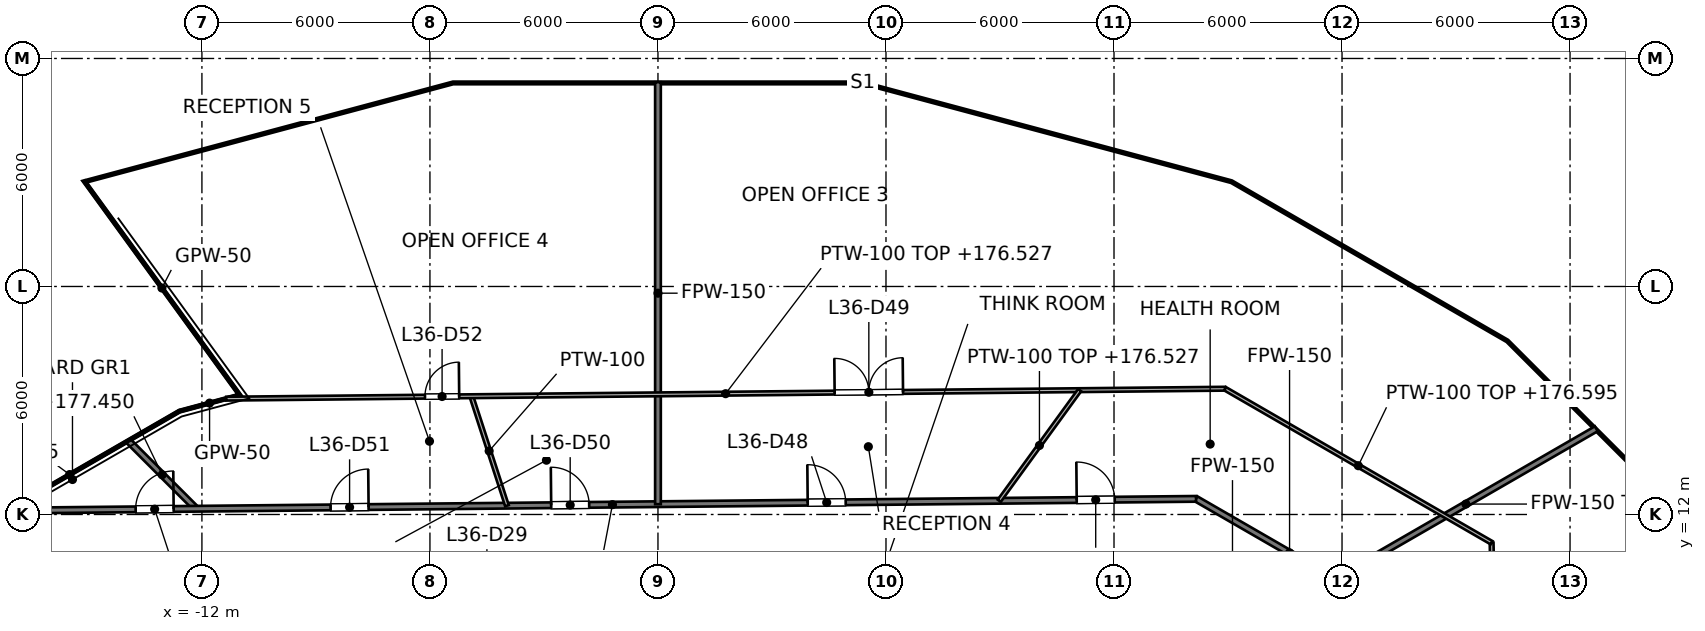
"""IFC4 building model, lengths in metres.
Left out: names, types, materials, properties, quantities, classifications, styles, units other than length and angle.
Written with IfcOpenShell. Run it as: python <this file> out.ifc"""

import sys

from ifc_helpers import new_model, si_unit, direction, frame, frame_2d, origin, place, context, subcontext, project, spatial, rectangle, extrude, element, fill, save


model = new_model("IFC4")
c1 = context("Model", 3, precision=1e-05, world=origin(), true_north=direction((0.0, 1.0)))
c2 = subcontext(c1, "Body", "Model", "MODEL_VIEW")
j1 = project(units=[si_unit("LENGTHUNIT", "METRE"), si_unit("PLANEANGLEUNIT", "RADIAN")], contexts=[c1])
p1 = place(None, origin())
s1 = spatial("IfcSite", under=j1, at=p1, CompositionType="ELEMENT")
p2 = place(p1, origin())
s2 = spatial("IfcBuilding", under=s1, at=p2, CompositionType="ELEMENT")
p3 = place(p2, frame((0.0, 0.0, 173.6)))
s3 = spatial("IfcBuildingStorey", under=s2, at=p3, CompositionType="ELEMENT", Elevation=173.6)
p4 = place(p3, frame((-13.94, 13.94, 0.0), z_axis=(0.0, 0.0, 1.0), x_axis=(0.707106781187, -0.707106781187, 0.0)))
e1 = element("IfcWall", 1, at=p4, inside=s3, PredefinedType="PARTITIONING", context=c2, shape_type="SweptSolid", body=[
    extrude(rectangle(XDim=2.53, YDim=0.15, at=frame_2d((1.265, 0.0))), origin(), (0.0, 0.0, 1.0), 3.85),
])
p5 = place(p3, frame((14.159, 12.412, 0.0), z_axis=(0.0, 0.0, 1.0), x_axis=(0.865963066672, -0.500107955506, 0.0)))
e2 = element("IfcWall", 2, at=p5, inside=s3, PredefinedType="PARTITIONING", context=c2, shape_type="SweptSolid", body=[
    extrude(rectangle(XDim=5.683, YDim=0.15, at=frame_2d((2.841, 0.0))), origin(), (0.0, 0.0, 1.0), 2.995),
])
p6 = place(p3, frame((-16.555, 12.107, 0.0), z_axis=(0.0, 0.0, 1.0), x_axis=(0.999950956073, 0.009903809825, 0.0)))
e3 = element("IfcWall", 3, at=p6, inside=s3, PredefinedType="PARTITIONING", context=c2, shape_type="SweptSolid", body=[
    extrude(rectangle(XDim=30.715, YDim=0.15, at=frame_2d((15.358, 0.0))), origin(), (0.0, 0.0, 1.0), 2.927),
])
p7 = place(p6, frame((27.575, 0.0, 0.0)))
e4 = element("IfcOpeningElement", 4, at=p7, cuts=e3, PredefinedType="OPENING", context=c2, shape_type="SweptSolid", body=[
    extrude(rectangle(XDim=1.0, YDim=2.1, at=frame_2d((0.5, 1.05))), frame((0.0, 0.075, 0.0), z_axis=(0.0, -1.0, 0.0), x_axis=(1.0, 0.0, 0.0)), (0.0, 0.0, 1.0), 0.15),
])
p8 = place(p6, frame((20.496, 0.0, 0.0)))
e5 = element("IfcOpeningElement", 5, at=p8, cuts=e3, PredefinedType="OPENING", context=c2, shape_type="SweptSolid", body=[
    extrude(rectangle(XDim=1.0, YDim=2.1, at=frame_2d((0.5, 1.05))), frame((0.0, 0.075, 0.0), z_axis=(0.0, -1.0, 0.0), x_axis=(1.0, 0.0, 0.0)), (0.0, 0.0, 1.0), 0.15),
])
p9 = place(p6, frame((13.746, 0.0, 0.0)))
e6 = element("IfcOpeningElement", 6, at=p9, cuts=e3, PredefinedType="OPENING", context=c2, shape_type="SweptSolid", body=[
    extrude(rectangle(XDim=1.0, YDim=2.1, at=frame_2d((0.5, 1.05))), frame((0.0, 0.075, 0.0), z_axis=(0.0, -1.0, 0.0), x_axis=(1.0, 0.0, 0.0)), (0.0, 0.0, 1.0), 0.15),
])
p10 = place(p6, frame((7.941, 0.0, 0.0)))
e7 = element("IfcOpeningElement", 7, at=p10, cuts=e3, PredefinedType="OPENING", context=c2, shape_type="SweptSolid", body=[
    extrude(rectangle(XDim=1.0, YDim=2.1, at=frame_2d((0.5, 1.05))), frame((0.0, 0.075, 0.0), z_axis=(0.0, -1.0, 0.0), x_axis=(1.0, 0.0, 0.0)), (0.0, 0.0, 1.0), 0.15),
])
p11 = place(p6, frame((2.812, 0.0, 0.0)))
e8 = element("IfcOpeningElement", 8, at=p11, cuts=e3, PredefinedType="OPENING", context=c2, shape_type="SweptSolid", body=[
    extrude(rectangle(XDim=1.0, YDim=2.1, at=frame_2d((0.5, 1.05))), frame((0.0, 0.075, 0.0), z_axis=(0.0, -1.0, 0.0), x_axis=(1.0, 0.0, 0.0)), (0.0, 0.0, 1.0), 0.15),
])
p12 = place(p3, frame((17.828, 10.293, 0.0), z_axis=(0.0, 0.0, 1.0), x_axis=(0.866006511702, 0.500032720618, 0.0)))
e9 = element("IfcWall", 9, at=p12, inside=s3, PredefinedType="PARTITIONING", context=c2, shape_type="SweptSolid", body=[
    extrude(rectangle(XDim=7.924, YDim=0.15, at=frame_2d((3.962, 0.0))), origin(), (0.0, 0.0, 1.0), 3.152),
])
p13 = place(p3, frame((0.0, 12.271, 0.0), z_axis=(0.0, 0.0, 1.0), x_axis=(0.0, 1.0, 0.0)))
e10 = element("IfcWall", 10, at=p13, inside=s3, PredefinedType="PARTITIONING", context=c2, shape_type="SweptSolid", body=[
    extrude(rectangle(XDim=11.105, YDim=0.15, at=frame_2d((5.552, 0.0))), origin(), (0.0, 0.0, 1.0), 2.995),
])
p14 = place(p3, frame((-15.1, 20.776, 0.0), z_axis=(0.0, 0.0, 1.0), x_axis=(0.587927764286, -0.808913434171, 0.0)))
e11 = element("IfcWall", 11, at=p14, inside=s3, PredefinedType="PARTITIONING", context=c2, shape_type="SweptSolid", body=[
    extrude(rectangle(XDim=6.963, YDim=0.05, at=frame_2d((3.482, 0.0))), origin(), (0.0, 0.0, 1.0), 2.927),
])
p15 = place(p3, frame((-12.591, 14.719, 0.0), z_axis=(0.0, 0.0, 1.0), x_axis=(0.965982574514, 0.258607164896, 0.0)))
e12 = element("IfcWall", 12, at=p15, inside=s3, PredefinedType="PARTITIONING", context=c2, shape_type="SweptSolid", body=[
    extrude(rectangle(XDim=1.641, YDim=0.05, at=frame_2d((0.82, 0.0))), origin(), (0.0, 0.0, 1.0), 2.927),
])
p16 = place(p3, frame((-18.371, 11.382, 0.0), z_axis=(0.0, 0.0, 1.0), x_axis=(0.866021723044, 0.500006375176, 0.0)))
e13 = element("IfcWall", 13, at=p16, inside=s3, PredefinedType="PARTITIONING", context=c2, shape_type="SweptSolid", body=[
    extrude(rectangle(XDim=6.674, YDim=0.05, at=frame_2d((3.337, 0.0))), origin(), (0.0, 0.0, 1.0), 2.995),
])
p17 = place(p3, frame((21.936, 11.258, 0.0), z_axis=(0.0, 0.0, 1.0), x_axis=(0.020580799217, -0.999788192921, 0.0)))
e14 = element("IfcWall", 14, at=p17, inside=s3, PredefinedType="PARTITIONING", context=c2, shape_type="SweptSolid", body=[
    extrude(rectangle(XDim=19.146, YDim=0.1, at=frame_2d((9.573, 0.0))), origin(), (0.0, 0.0, 1.0), 2.927),
])
p18 = place(p17, frame((1.724, 0.0, 0.0)))
e15 = element("IfcOpeningElement", 15, at=p18, cuts=e14, PredefinedType="OPENING", context=c2, shape_type="SweptSolid", body=[
    extrude(rectangle(XDim=1.8, YDim=2.1, at=frame_2d((0.9, 1.05))), frame((0.0, 0.05, 0.0), z_axis=(0.0, -1.0, 0.0), x_axis=(1.0, 0.0, 0.0)), (0.0, 0.0, 1.0), 0.1),
])
p19 = place(p3, frame((-4.91, 15.112, 0.0), z_axis=(0.0, 0.0, 1.0), x_axis=(0.30901133164, -0.951058356211, 0.0)))
e16 = element("IfcWall", 16, at=p19, inside=s3, PredefinedType="PARTITIONING", context=c2, shape_type="SweptSolid", body=[
    extrude(rectangle(XDim=3.028, YDim=0.1, at=frame_2d((1.514, 0.0))), origin(), (0.0, 0.0, 1.0), 3.85),
])
p20 = place(p3, frame((14.92, 15.31, 0.0), z_axis=(0.0, 0.0, 1.0), x_axis=(0.865883926938, -0.500244965063, 0.0)))
e17 = element("IfcWall", 17, at=p20, inside=s3, PredefinedType="PARTITIONING", context=c2, shape_type="SweptSolid", body=[
    extrude(rectangle(XDim=8.102, YDim=0.1, at=frame_2d((4.051, 0.0))), origin(), (0.0, 0.0, 1.0), 2.995),
])
p21 = place(p3, frame((-11.36, 15.048, 0.0), z_axis=(0.0, 0.0, 1.0), x_axis=(0.999950506848, 0.00994906304, 0.0)))
e18 = element("IfcWall", 18, at=p21, inside=s3, PredefinedType="PARTITIONING", context=c2, shape_type="SweptSolid", body=[
    extrude(rectangle(XDim=26.281, YDim=0.1, at=frame_2d((13.141, 0.0))), origin(), (0.0, 0.0, 1.0), 2.927),
])
p22 = place(p21, frame((16.01, 0.0, 0.0)))
e19 = element("IfcOpeningElement", 19, at=p22, cuts=e18, PredefinedType="OPENING", context=c2, shape_type="SweptSolid", body=[
    extrude(rectangle(XDim=1.8, YDim=2.1, at=frame_2d((0.9, 1.05))), frame((0.0, 0.05, 0.0), z_axis=(0.0, -1.0, 0.0), x_axis=(1.0, 0.0, 0.0)), (0.0, 0.0, 1.0), 0.1),
])
p23 = place(p21, frame((5.23, 0.0, 0.0)))
e20 = element("IfcOpeningElement", 20, at=p23, cuts=e18, PredefinedType="OPENING", context=c2, shape_type="SweptSolid", body=[
    extrude(rectangle(XDim=0.9, YDim=2.1, at=frame_2d((0.45, 1.05))), frame((0.0, 0.05, 0.0), z_axis=(0.0, -1.0, 0.0), x_axis=(1.0, 0.0, 0.0)), (0.0, 0.0, 1.0), 0.1),
])
p24 = place(p3, frame((8.98, 12.361, 0.0), z_axis=(0.0, 0.0, 1.0), x_axis=(0.587982092085, 0.808873945301, 0.0)))
e21 = element("IfcWall", 21, at=p24, inside=s3, PredefinedType="PARTITIONING", context=c2, shape_type="SweptSolid", body=[
    extrude(rectangle(XDim=3.599, YDim=0.1, at=frame_2d((1.799, 0.0))), origin(), (0.0, 0.0, 1.0), 2.927),
])
p25 = place(p7, origin())
e22 = element("IfcDoor", 22, at=p25, inside=s3, OperationType="SINGLE_SWING_LEFT", PredefinedType="DOOR", context=c2, shape_type="SweptSolid", body=[
    extrude(rectangle(XDim=1.0, YDim=2.1, at=frame_2d((0.5, 1.05))), frame((0.0, 0.025, 0.0), z_axis=(0.0, -1.0, 0.0), x_axis=(1.0, 0.0, 0.0)), (0.0, 0.0, 1.0), 0.05),
])
fill(e4, e22)
p26 = place(p8, origin())
e23 = element("IfcDoor", 23, at=p26, inside=s3, OperationType="SINGLE_SWING_LEFT", PredefinedType="DOOR", context=c2, shape_type="SweptSolid", body=[
    extrude(rectangle(XDim=1.0, YDim=2.1, at=frame_2d((0.5, 1.05))), frame((0.0, 0.025, 0.0), z_axis=(0.0, -1.0, 0.0), x_axis=(1.0, 0.0, 0.0)), (0.0, 0.0, 1.0), 0.05),
])
fill(e5, e23)
p27 = place(p22, origin())
e24 = element("IfcDoor", 24, at=p27, inside=s3, OperationType="DOUBLE_DOOR_SINGLE_SWING", PredefinedType="DOOR", context=c2, shape_type="SweptSolid", body=[
    extrude(rectangle(XDim=1.8, YDim=2.1, at=frame_2d((0.9, 1.05))), frame((0.0, 0.025, 0.0), z_axis=(0.0, -1.0, 0.0), x_axis=(1.0, 0.0, 0.0)), (0.0, 0.0, 1.0), 0.05),
])
fill(e19, e24)
p28 = place(p9, origin())
e25 = element("IfcDoor", 25, at=p28, inside=s3, OperationType="SINGLE_SWING_LEFT", PredefinedType="DOOR", context=c2, shape_type="SweptSolid", body=[
    extrude(rectangle(XDim=1.0, YDim=2.1, at=frame_2d((0.5, 1.05))), frame((0.0, 0.025, 0.0), z_axis=(0.0, -1.0, 0.0), x_axis=(1.0, 0.0, 0.0)), (0.0, 0.0, 1.0), 0.05),
])
fill(e6, e25)
p29 = place(p10, origin())
e26 = element("IfcDoor", 26, at=p29, inside=s3, OperationType="SINGLE_SWING_RIGHT", PredefinedType="DOOR", context=c2, shape_type="SweptSolid", body=[
    extrude(rectangle(XDim=1.0, YDim=2.1, at=frame_2d((0.5, 1.05))), frame((0.0, 0.025, 0.0), z_axis=(0.0, -1.0, 0.0), x_axis=(1.0, 0.0, 0.0)), (0.0, 0.0, 1.0), 0.05),
])
fill(e7, e26)
p30 = place(p23, origin())
e27 = element("IfcDoor", 27, at=p30, inside=s3, OperationType="SINGLE_SWING_RIGHT", PredefinedType="DOOR", context=c2, shape_type="SweptSolid", body=[
    extrude(rectangle(XDim=0.9, YDim=2.1, at=frame_2d((0.45, 1.05))), frame((0.0, 0.025, 0.0), z_axis=(0.0, -1.0, 0.0), x_axis=(1.0, 0.0, 0.0)), (0.0, 0.0, 1.0), 0.05),
])
fill(e20, e27)
p31 = place(p11, origin())
e28 = element("IfcDoor", 28, at=p31, inside=s3, OperationType="SINGLE_SWING_RIGHT", PredefinedType="DOOR", context=c2, shape_type="SweptSolid", body=[
    extrude(rectangle(XDim=1.0, YDim=2.1, at=frame_2d((0.5, 1.05))), frame((0.0, 0.025, 0.0), z_axis=(0.0, -1.0, 0.0), x_axis=(1.0, 0.0, 0.0)), (0.0, 0.0, 1.0), 0.05),
])
fill(e8, e28)
save(model, sys.argv[1])
